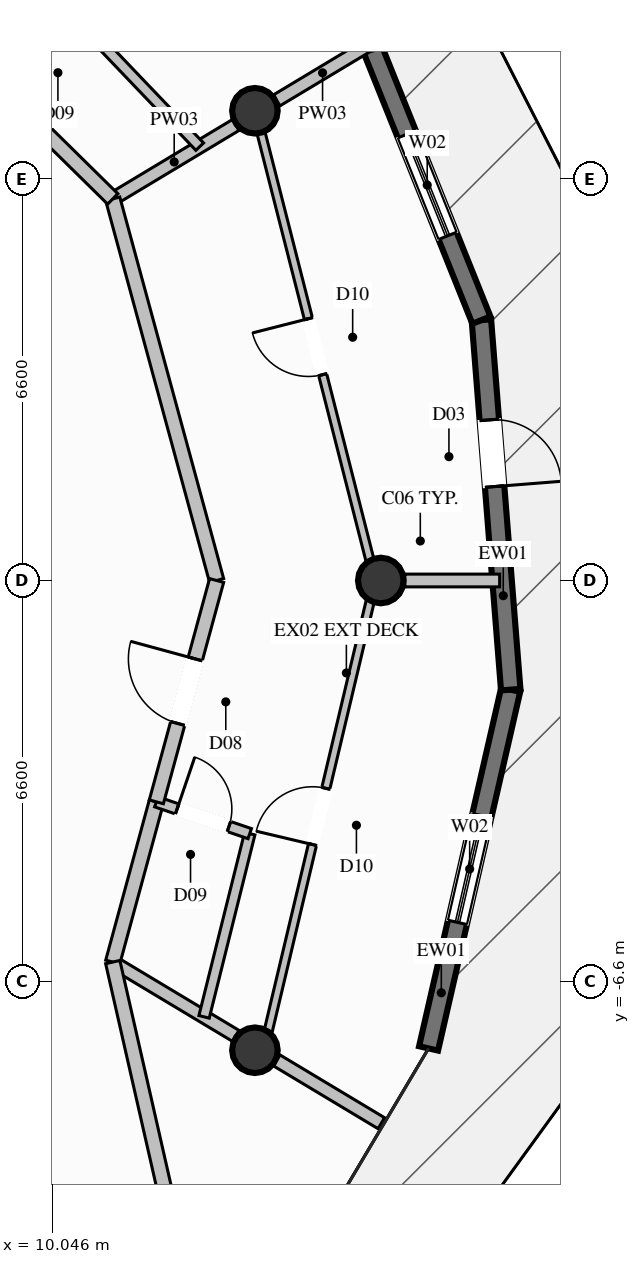
"""IFC4 building model, lengths in metres.
Left out: names, types, materials, properties, quantities, classifications, styles, units other than length and angle.
Written with IfcOpenShell. Run it as: python <this file> out.ifc"""

import sys

from ifc_helpers import new_model, si_unit, direction, frame, frame_2d, origin, origin_2d, place, context, subcontext, project, spatial, rectangle, circle, extrude, element, fill, save


model = new_model("IFC4")
c1 = context("Model", 3, precision=1e-05, world=origin(), true_north=direction((0.0, 1.0)))
c2 = subcontext(c1, "Body", "Model", "MODEL_VIEW")
j1 = project(units=[si_unit("LENGTHUNIT", "METRE"), si_unit("PLANEANGLEUNIT", "RADIAN")], contexts=[c1])
p1 = place(None, origin())
s1 = spatial("IfcSite", under=j1, at=p1, CompositionType="ELEMENT")
p2 = place(p1, origin())
s2 = spatial("IfcBuilding", under=s1, at=p2, CompositionType="ELEMENT")
p3 = place(p2, frame((0.0, 0.0, 243.0)))
s3 = spatial("IfcBuildingStorey", under=s2, at=p3, CompositionType="ELEMENT", Elevation=243.0)
for number, where, z_axis, x_axis in (
    (1, (15.45, 0.0, 0.0), (0.0, 0.0, 1.0), (1.0, 0.0, 0.0)),
    (2, (13.38, 7.725, 0.0), (0.0, 0.0, 1.0), (1.0, 0.0, 0.0)),
    (3, (13.38, -7.725, 0.0), (0.0, 0.0, 1.0), (1.0, 0.0, 0.0)),
):
    element("IfcColumn", number, at=place(p3, frame(where, z_axis=z_axis, x_axis=x_axis)), inside=s3, PredefinedType="COLUMN", context=c2, shape_type="SweptSolid", body=[
        extrude(circle(Radius=0.375, at=origin_2d()), origin(), (0.0, 0.0, 1.0), 3.8),
    ])
p4 = place(p3, frame((17.587, -1.795, 0.0), z_axis=(0.0, 0.0, 1.0), x_axis=(-0.223174159959, -0.974778587335, 0.0)))
e4 = element("IfcWall", 4, at=p4, inside=s3, PredefinedType="SOLIDWALL", context=c2, shape_type="SweptSolid", body=[
    extrude(rectangle(XDim=6.053, YDim=0.32, at=frame_2d((3.026, 0.0))), origin(), (0.0, 0.0, 1.0), 3.57),
])
p5 = place(p4, frame((2.126, 0.0, 0.35)))
e5 = element("IfcOpeningElement", 5, at=p5, cuts=e4, PredefinedType="OPENING", context=c2, shape_type="SweptSolid", body=[
    extrude(rectangle(XDim=1.8, YDim=2.6, at=frame_2d((0.9, 1.3))), frame((0.0, 0.17, 0.0), z_axis=(0.0, -1.0, 0.0), x_axis=(1.0, 0.0, 0.0)), (0.0, 0.0, 1.0), 0.34),
])
p6 = place(p3, frame((17.105, 4.282, 0.0), z_axis=(0.0, 0.0, 1.0), x_axis=(0.079057550351, -0.996870053584, 0.0)))
e6 = element("IfcWall", 6, at=p6, inside=s3, PredefinedType="SOLIDWALL", context=c2, shape_type="SweptSolid", body=[
    extrude(rectangle(XDim=6.096, YDim=0.32, at=frame_2d((3.048, 0.0))), origin(), (0.0, 0.0, 1.0), 3.57),
])
p7 = place(p6, frame((1.646, 0.0, 0.0)))
e7 = element("IfcOpeningElement", 7, at=p7, cuts=e6, PredefinedType="OPENING", context=c2, shape_type="SweptSolid", body=[
    extrude(rectangle(XDim=1.1, YDim=2.2, at=frame_2d((0.55, 1.1))), frame((0.0, 0.17, 0.0), z_axis=(0.0, -1.0, 0.0), x_axis=(1.0, 0.0, 0.0)), (0.0, 0.0, 1.0), 0.34),
])
p8 = place(p3, frame((14.835, 9.939, 0.0), z_axis=(0.0, 0.0, 1.0), x_axis=(0.372412492589, -0.928067311871, 0.0)))
e8 = element("IfcWall", 8, at=p8, inside=s3, PredefinedType="SOLIDWALL", context=c2, shape_type="SweptSolid", body=[
    extrude(rectangle(XDim=6.095, YDim=0.32, at=frame_2d((3.048, 0.0))), origin(), (0.0, 0.0, 1.0), 3.57),
])
p9 = place(p8, frame((2.802, 0.0, 0.35)))
e9 = element("IfcOpeningElement", 9, at=p9, cuts=e8, PredefinedType="OPENING", context=c2, shape_type="SweptSolid", body=[
    extrude(rectangle(XDim=1.8, YDim=2.6, at=frame_2d((0.9, 1.3))), frame((0.0, 0.17, 0.0), z_axis=(0.0, -1.0, 0.0), x_axis=(1.0, 0.0, 0.0)), (0.0, 0.0, 1.0), 0.34),
])
p10 = place(p3, frame((11.042, 6.275, 0.0), z_axis=(0.0, 0.0, 1.0), x_axis=(0.857026686246, 0.515272024335, 0.0)))
e10 = element("IfcWall", 10, at=p10, inside=s3, PredefinedType="PARTITIONING", context=c2, shape_type="SweptSolid", body=[
    extrude(rectangle(XDim=2.358, YDim=0.21, at=frame_2d((1.179, 0.0))), origin(), (0.0, 0.0, 1.0), 3.086),
])
p11 = place(p3, frame((13.737, 7.895, 0.0), z_axis=(0.0, 0.0, 1.0), x_axis=(0.857150569961, 0.515065918514, 0.0)))
e11 = element("IfcWall", 11, at=p11, inside=s3, PredefinedType="PARTITIONING", context=c2, shape_type="SweptSolid", body=[
    extrude(rectangle(XDim=1.763, YDim=0.21, at=frame_2d((0.881, 0.0))), origin(), (0.0, 0.0, 1.0), 3.57),
])
p12 = place(p3, frame((11.042, -6.275, 0.0), z_axis=(0.0, 0.0, 1.0), x_axis=(0.857502061287, -0.514480529164, 0.0)))
e12 = element("IfcWall", 12, at=p12, inside=s3, PredefinedType="PARTITIONING", context=c2, shape_type="SweptSolid", body=[
    extrude(rectangle(XDim=2.358, YDim=0.21, at=frame_2d((1.179, 0.0))), origin(), (0.0, 0.0, 1.0), 3.086),
])
p13 = place(p3, frame((13.738, -7.892, 0.0), z_axis=(0.0, 0.0, 1.0), x_axis=(0.857407053578, -0.514638848587, 0.0)))
e13 = element("IfcWall", 13, at=p13, inside=s3, PredefinedType="PARTITIONING", context=c2, shape_type="SweptSolid", body=[
    extrude(rectangle(XDim=2.007, YDim=0.21, at=frame_2d((1.003, 0.0))), origin(), (0.0, 0.0, 1.0), 3.57),
])
p14 = place(p3, frame((11.042, -6.275, 0.0), z_axis=(0.0, 0.0, 1.0), x_axis=(0.262572701387, 0.964912211803, 0.0)))
e14 = element("IfcWall", 14, at=p14, inside=s3, PredefinedType="PARTITIONING", context=c2, shape_type="SweptSolid", body=[
    extrude(rectangle(XDim=2.731, YDim=0.24, at=frame_2d((1.365, 0.0))), origin(), (0.0, 0.0, 1.0), 3.57),
])
p15 = place(p3, frame((12.544, -7.176, 0.0), z_axis=(0.0, 0.0, 1.0), x_axis=(0.241851063072, 0.970313384062, 0.0)))
e15 = element("IfcWall", 15, at=p15, inside=s3, PredefinedType="PLUMBINGWALL", context=c2, shape_type="SweptSolid", body=[
    extrude(rectangle(XDim=3.105, YDim=0.175, at=frame_2d((1.553, 0.0))), origin(), (0.0, 0.0, 1.0), 3.57),
])
p16 = place(p3, frame((11.759, -3.64, 0.0), z_axis=(0.0, 0.0, 1.0), x_axis=(0.946586404748, -0.322450272671, 0.0)))
e16 = element("IfcWall", 16, at=p16, inside=s3, PredefinedType="PLUMBINGWALL", context=c2, shape_type="SweptSolid", body=[
    extrude(rectangle(XDim=1.623, YDim=0.175, at=frame_2d((0.811, 0.0))), origin(), (0.0, 0.0, 1.0), 3.57),
])
p17 = place(p16, frame((0.361, 0.0, 0.0)))
e17 = element("IfcOpeningElement", 17, at=p17, cuts=e16, PredefinedType="OPENING", context=c2, shape_type="SweptSolid", body=[
    extrude(rectangle(XDim=0.9, YDim=2.1, at=frame_2d((0.45, 1.05))), frame((0.0, 0.098, 0.0), z_axis=(0.0, -1.0, 0.0), x_axis=(1.0, 0.0, 0.0)), (0.0, 0.0, 1.0), 0.195),
])
p18 = place(p3, frame((15.845, 0.0, 0.0), z_axis=(0.0, 0.0, 1.0), x_axis=(1.0, 0.0, 0.0)))
e18 = element("IfcWall", 18, at=p18, inside=s3, PredefinedType="PARTITIONING", context=c2, shape_type="SweptSolid", body=[
    extrude(rectangle(XDim=1.56, YDim=0.21, at=frame_2d((0.78, 0.0))), origin(), (0.0, 0.0, 1.0), 3.57),
])
p19 = place(p3, frame((12.75, 0.0, 0.0), z_axis=(0.0, 0.0, 1.0), x_axis=(-0.262640884433, 0.964893655189, 0.0)))
e19 = element("IfcWall", 19, at=p19, inside=s3, PredefinedType="PARTITIONING", context=c2, shape_type="SweptSolid", body=[
    extrude(rectangle(XDim=6.503, YDim=0.24, at=frame_2d((3.251, 0.0))), origin(), (0.0, 0.0, 1.0), 3.57),
])
p20 = place(p3, frame((11.759, -3.64, 0.0), z_axis=(0.0, 0.0, 1.0), x_axis=(0.2626902414, 0.964880219029, 0.0)))
e20 = element("IfcWall", 20, at=p20, inside=s3, PredefinedType="PARTITIONING", context=c2, shape_type="SweptSolid", body=[
    extrude(rectangle(XDim=3.772, YDim=0.24, at=frame_2d((1.886, 0.0))), origin(), (0.0, 0.0, 1.0), 3.57),
])
p21 = place(p20, frame((1.336, 0.0, 0.0)))
e21 = element("IfcOpeningElement", 21, at=p21, cuts=e20, PredefinedType="OPENING", context=c2, shape_type="SweptSolid", body=[
    extrude(rectangle(XDim=1.1, YDim=2.3, at=frame_2d((0.55, 1.15))), frame((0.0, 0.13, 0.0), z_axis=(0.0, -1.0, 0.0), x_axis=(1.0, 0.0, 0.0)), (0.0, 0.0, 1.0), 0.26),
])
p22 = place(p3, frame((13.516, -7.759, 0.0), z_axis=(0.0, 0.0, 1.0), x_axis=(0.230840940032, 0.972991500685, 0.0)))
e22 = element("IfcWall", 22, at=p22, inside=s3, PredefinedType="PARTITIONING", context=c2, shape_type="SweptSolid", body=[
    extrude(rectangle(XDim=7.974, YDim=0.135, at=frame_2d((3.987, 0.0))), origin(), (0.0, 0.0, 1.0), 3.139),
])
p23 = place(p22, frame((3.512, 0.0, 0.0)))
e23 = element("IfcOpeningElement", 23, at=p23, cuts=e22, PredefinedType="OPENING", context=c2, shape_type="SweptSolid", body=[
    extrude(rectangle(XDim=0.95, YDim=2.1, at=frame_2d((0.475, 1.05))), frame((0.0, 0.078, 0.0), z_axis=(0.0, -1.0, 0.0), x_axis=(1.0, 0.0, 0.0)), (0.0, 0.0, 1.0), 0.155),
])
p24 = place(p3, frame((15.357, 0.0, 0.0), z_axis=(0.0, 0.0, 1.0), x_axis=(-0.246948201866, 0.969028681513, 0.0)))
e24 = element("IfcWall", 24, at=p24, inside=s3, PredefinedType="PARTITIONING", context=c2, shape_type="SweptSolid", body=[
    extrude(rectangle(XDim=7.937, YDim=0.135, at=frame_2d((3.968, 0.0))), origin(), (0.0, 0.0, 1.0), 3.139),
])
p25 = place(p24, frame((3.493, 0.0, 0.0)))
e25 = element("IfcOpeningElement", 25, at=p25, cuts=e24, PredefinedType="OPENING", context=c2, shape_type="SweptSolid", body=[
    extrude(rectangle(XDim=0.95, YDim=2.1, at=frame_2d((0.475, 1.05))), frame((0.0, 0.078, 0.0), z_axis=(0.0, -1.0, 0.0), x_axis=(1.0, 0.0, 0.0)), (0.0, 0.0, 1.0), 0.155),
])
p26 = place(p3, frame((11.042, 6.275, 0.0), z_axis=(0.0, 0.0, 1.0), x_axis=(-0.712677423321, 0.701491903224, 0.0)))
e26 = element("IfcWall", 26, at=p26, inside=s3, PredefinedType="PARTITIONING", context=c2, shape_type="SweptSolid", body=[
    extrude(rectangle(XDim=2.75, YDim=0.24, at=frame_2d((1.375, 0.0))), origin(), (0.0, 0.0, 1.0), 3.57),
])
p27 = place(p3, frame((12.472, 7.135, 0.0), z_axis=(0.0, 0.0, 1.0), x_axis=(-0.690671718567, 0.723168429324, 0.0)))
e27 = element("IfcWall", 27, at=p27, inside=s3, PredefinedType="PLUMBINGWALL", context=c2, shape_type="SweptSolid", body=[
    extrude(rectangle(XDim=3.14, YDim=0.175, at=frame_2d((1.57, 0.0))), origin(), (0.0, 0.0, 1.0), 3.57),
])
p28 = place(p3, frame((9.082, 8.204, 0.0), z_axis=(0.0, 0.0, 1.0), x_axis=(0.712642440828, 0.701527441751, 0.0)))
e28 = element("IfcWall", 28, at=p28, inside=s3, PredefinedType="PLUMBINGWALL", context=c2, shape_type="SweptSolid", body=[
    extrude(rectangle(XDim=1.713, YDim=0.175, at=frame_2d((0.857, 0.0))), origin(), (0.0, 0.0, 1.0), 3.57),
])
p29 = place(p28, frame((0.407, 0.0, 0.0)))
e29 = element("IfcOpeningElement", 29, at=p29, cuts=e28, PredefinedType="OPENING", context=c2, shape_type="SweptSolid", body=[
    extrude(rectangle(XDim=0.9, YDim=2.1, at=frame_2d((0.45, 1.05))), frame((0.0, 0.098, 0.0), z_axis=(0.0, -1.0, 0.0), x_axis=(1.0, 0.0, 0.0)), (0.0, 0.0, 1.0), 0.195),
])
p30 = place(p3, frame((12.3, -11.8, 0.0), z_axis=(0.0, 0.0, 1.0), x_axis=(-0.222014008723, 0.975043475918, 0.0)))
e30 = element("IfcWall", 30, at=p30, inside=s3, PredefinedType="PARTITIONING", context=c2, shape_type="SweptSolid", body=[
    extrude(rectangle(XDim=5.667, YDim=0.24, at=frame_2d((2.833, 0.0))), origin(), (0.0, 0.0, 1.0), 3.57),
])
p31 = place(p5, origin())
e31 = element("IfcWindow", 31, at=p31, inside=s3, PartitioningType="SINGLE_PANEL", PredefinedType="WINDOW", context=c2, shape_type="SweptSolid", body=[
    extrude(rectangle(XDim=1.8, YDim=2.6, at=frame_2d((0.9, 1.3))), frame((0.0, 0.03, 0.0), z_axis=(0.0, -1.0, 0.0), x_axis=(1.0, 0.0, 0.0)), (0.0, 0.0, 1.0), 0.06),
])
fill(e5, e31)
p32 = place(p7, origin())
e32 = element("IfcDoor", 32, at=p32, inside=s3, OperationType="SINGLE_SWING_RIGHT", PredefinedType="DOOR", context=c2, shape_type="SweptSolid", body=[
    extrude(rectangle(XDim=1.1, YDim=2.2, at=frame_2d((0.55, 1.1))), frame((0.0, 0.025, 0.0), z_axis=(0.0, -1.0, 0.0), x_axis=(1.0, 0.0, 0.0)), (0.0, 0.0, 1.0), 0.05),
])
fill(e7, e32)
p33 = place(p9, origin())
e33 = element("IfcWindow", 33, at=p33, inside=s3, PartitioningType="SINGLE_PANEL", PredefinedType="WINDOW", context=c2, shape_type="SweptSolid", body=[
    extrude(rectangle(XDim=1.8, YDim=2.6, at=frame_2d((0.9, 1.3))), frame((0.0, 0.03, 0.0), z_axis=(0.0, -1.0, 0.0), x_axis=(1.0, 0.0, 0.0)), (0.0, 0.0, 1.0), 0.06),
])
fill(e9, e33)
p34 = place(p17, origin())
e34 = element("IfcDoor", 34, at=p34, inside=s3, OperationType="SINGLE_SWING_LEFT", PredefinedType="DOOR", context=c2, shape_type="SweptSolid", body=[
    extrude(rectangle(XDim=0.9, YDim=2.1, at=frame_2d((0.45, 1.05))), frame((0.0, 0.025, 0.0), z_axis=(0.0, -1.0, 0.0), x_axis=(1.0, 0.0, 0.0)), (0.0, 0.0, 1.0), 0.05),
])
fill(e17, e34)
p35 = place(p21, origin())
e35 = element("IfcDoor", 35, at=p35, inside=s3, OperationType="SINGLE_SWING_RIGHT", PredefinedType="DOOR", context=c2, shape_type="SweptSolid", body=[
    extrude(rectangle(XDim=1.1, YDim=2.3, at=frame_2d((0.55, 1.15))), frame((0.0, 0.025, 0.0), z_axis=(0.0, -1.0, 0.0), x_axis=(1.0, 0.0, 0.0)), (0.0, 0.0, 1.0), 0.05),
])
fill(e21, e35)
p36 = place(p23, origin())
e36 = element("IfcDoor", 36, at=p36, inside=s3, OperationType="SINGLE_SWING_LEFT", PredefinedType="DOOR", context=c2, shape_type="SweptSolid", body=[
    extrude(rectangle(XDim=0.95, YDim=2.1, at=frame_2d((0.475, 1.05))), frame((0.0, 0.025, 0.0), z_axis=(0.0, -1.0, 0.0), x_axis=(1.0, 0.0, 0.0)), (0.0, 0.0, 1.0), 0.05),
])
fill(e23, e36)
p37 = place(p25, origin())
e37 = element("IfcDoor", 37, at=p37, inside=s3, OperationType="SINGLE_SWING_RIGHT", PredefinedType="DOOR", context=c2, shape_type="SweptSolid", body=[
    extrude(rectangle(XDim=0.95, YDim=2.1, at=frame_2d((0.475, 1.05))), frame((0.0, 0.025, 0.0), z_axis=(0.0, -1.0, 0.0), x_axis=(1.0, 0.0, 0.0)), (0.0, 0.0, 1.0), 0.05),
])
fill(e25, e37)
save(model, sys.argv[1])
